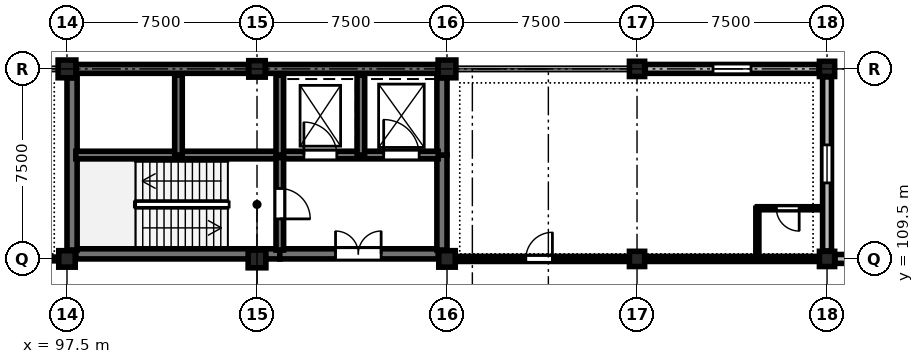
"""IFC4 building model, lengths in metres.
Left out: names, types, materials, properties, quantities, classifications, styles, units other than length and angle.
Written with IfcOpenShell. Run it as: python <this file> out.ifc"""

import sys

from ifc_helpers import new_model, si_unit, direction, frame, frame_2d, origin, origin_2d, place, context, subcontext, project, spatial, rectangle, circle, extrude, element, fill, save


model = new_model("IFC4")
c1 = context("Model", 3, precision=1e-05, world=origin(), true_north=direction((0.0, 1.0)))
c2 = subcontext(c1, "Body", "Model", "MODEL_VIEW")
j1 = project(units=[si_unit("LENGTHUNIT", "METRE"), si_unit("PLANEANGLEUNIT", "RADIAN")], contexts=[c1])
p1 = place(None, origin())
s1 = spatial("IfcSite", under=j1, at=p1, CompositionType="ELEMENT")
p2 = place(p1, origin())
s2 = spatial("IfcBuilding", under=s1, at=p2, CompositionType="ELEMENT")
p3 = place(p2, frame((0.0, 0.0, 9.3)))
s3 = spatial("IfcBuildingStorey", under=s2, at=p3, CompositionType="ELEMENT", Elevation=9.3)
p4 = place(p3, frame((97.5, 109.5, 0.0), z_axis=(0.0, 0.0, 1.0), x_axis=(1.0, 0.0, 0.0)))
e1 = element("IfcColumn", 1, at=p4, inside=s3, PredefinedType="COLUMN", context=c2, shape_type="SweptSolid", body=[
    extrude(rectangle(XDim=0.65, YDim=0.65, at=origin_2d()), origin(), (0.0, 0.0, 1.0), 4.8),
])
for number, where, z_axis, x_axis in (
    (2, (97.5, 117.0, 0.0), (0.0, 0.0, 1.0), (1.0, 0.0, 0.0)),
    (3, (105.0, 109.5, 0.0), (0.0, 0.0, 1.0), (1.0, 0.0, 0.0)),
):
    element("IfcColumn", number, at=place(p3, frame(where, z_axis=z_axis, x_axis=x_axis)), inside=s3, PredefinedType="COLUMN", context=c2, shape_type="SweptSolid", body=[
        extrude(rectangle(XDim=0.7, YDim=0.7, at=origin_2d()), origin(), (0.0, 0.0, 1.0), 4.8),
    ])
for number, where, z_axis, x_axis in (
    (4, (105.0, 117.0, 0.0), (0.0, 0.0, 1.0), (1.0, 0.0, 0.0)),
    (5, (112.5, 109.5, 0.0), (0.0, 0.0, 1.0), (1.0, 0.0, 0.0)),
):
    element("IfcColumn", number, at=place(p3, frame(where, z_axis=z_axis, x_axis=x_axis)), inside=s3, PredefinedType="COLUMN", context=c2, shape_type="SweptSolid", body=[
        extrude(rectangle(XDim=0.65, YDim=0.65, at=origin_2d()), origin(), (0.0, 0.0, 1.0), 4.8),
    ])
p5 = place(p3, frame((112.5, 117.0, 0.0), z_axis=(0.0, 0.0, 1.0), x_axis=(1.0, 0.0, 0.0)))
e6 = element("IfcColumn", 6, at=p5, inside=s3, PredefinedType="COLUMN", context=c2, shape_type="SweptSolid", body=[
    extrude(rectangle(XDim=0.7, YDim=0.7, at=origin_2d()), origin(), (0.0, 0.0, 1.0), 4.8),
])
p6 = place(p3, frame((120.0, 109.5, 0.0), z_axis=(0.0, 0.0, 1.0), x_axis=(1.0, 0.0, 0.0)))
e7 = element("IfcColumn", 7, at=p6, inside=s3, PredefinedType="COLUMN", context=c2, shape_type="SweptSolid", body=[
    extrude(circle(Radius=0.3, at=origin_2d()), origin(), (0.0, 0.0, 1.0), 4.8),
])
for number, where, z_axis, x_axis in (
    (8, (120.0, 117.0, 0.0), (0.0, 0.0, 1.0), (1.0, 0.0, 0.0)),
    (9, (127.5, 109.5, 0.0), (0.0, 0.0, 1.0), (1.0, 0.0, 0.0)),
    (10, (127.5, 117.0, 0.0), (0.0, 0.0, 1.0), (1.0, 0.0, 0.0)),
):
    element("IfcColumn", number, at=place(p3, frame(where, z_axis=z_axis, x_axis=x_axis)), inside=s3, PredefinedType="COLUMN", context=c2, shape_type="SweptSolid", body=[
        extrude(rectangle(XDim=0.6, YDim=0.6, at=origin_2d()), origin(), (0.0, 0.0, 1.0), 4.8),
    ])
for number, where, z_axis, x_axis in (
    (11, (97.86, 117.0, 0.0), (0.0, 0.0, 1.0), (1.0, 0.0, 0.0)),
    (12, (105.335, 117.0, 0.0), (0.0, 0.0, 1.0), (1.0, 0.0, 0.0)),
):
    element("IfcWall", number, at=place(p3, frame(where, z_axis=z_axis, x_axis=x_axis)), inside=s3, PredefinedType="SHEAR", context=c2, shape_type="SweptSolid", body=[
        extrude(rectangle(XDim=6.805, YDim=0.35, at=frame_2d((3.402, 0.0))), origin(), (0.0, 0.0, 1.0), 4.55),
    ])
p7 = place(p3, frame((120.31, 117.0, 0.0), z_axis=(0.0, 0.0, 1.0), x_axis=(1.0, 0.0, 0.0)))
e13 = element("IfcWall", 13, at=p7, inside=s3, PredefinedType="STANDARD", context=c2, shape_type="SweptSolid", body=[
    extrude(rectangle(XDim=6.88, YDim=0.35, at=frame_2d((3.44, 0.0))), origin(), (0.0, 0.0, 1.0), 3.95),
])
p8 = place(p7, frame((2.69, 0.0, 0.9)))
e14 = element("IfcOpeningElement", 14, at=p8, cuts=e13, PredefinedType="OPENING", context=c2, shape_type="SweptSolid", body=[
    extrude(rectangle(XDim=1.5, YDim=2.1, at=frame_2d((0.75, 1.05))), frame((0.0, 0.185, 0.0), z_axis=(0.0, -1.0, 0.0), x_axis=(1.0, 0.0, 0.0)), (0.0, 0.0, 1.0), 0.37),
])
p9 = place(p3, frame((127.5, 116.69, 0.0), z_axis=(0.0, 0.0, 1.0), x_axis=(0.0, -1.0, 0.0)))
e15 = element("IfcWall", 15, at=p9, inside=s3, PredefinedType="STANDARD", context=c2, shape_type="SweptSolid", body=[
    extrude(rectangle(XDim=6.88, YDim=0.35, at=frame_2d((3.44, 0.0))), origin(), (0.0, 0.0, 1.0), 3.95),
])
p10 = place(p9, frame((2.69, 0.0, 0.9)))
e16 = element("IfcOpeningElement", 16, at=p10, cuts=e15, PredefinedType="OPENING", context=c2, shape_type="SweptSolid", body=[
    extrude(rectangle(XDim=1.5, YDim=2.1, at=frame_2d((0.75, 1.05))), frame((0.0, 0.185, 0.0), z_axis=(0.0, -1.0, 0.0), x_axis=(1.0, 0.0, 0.0)), (0.0, 0.0, 1.0), 0.37),
])
p11 = place(p3, frame((127.81, 109.5, 0.0), z_axis=(0.0, 0.0, 1.0), x_axis=(1.0, 0.0, 0.0)))
e17 = element("IfcWall", 17, at=p11, inside=s3, PredefinedType="STANDARD", context=c2, shape_type="SweptSolid", body=[
    extrude(rectangle(XDim=6.88, YDim=0.35, at=frame_2d((3.44, 0.0))), origin(), (0.0, 0.0, 1.0), 3.95),
])
p12 = place(p11, frame((2.69, 0.0, 0.9)))
e18 = element("IfcOpeningElement", 18, at=p12, cuts=e17, PredefinedType="OPENING", context=c2, shape_type="SweptSolid", body=[
    extrude(rectangle(XDim=1.5, YDim=2.1, at=frame_2d((0.75, 1.05))), frame((0.0, 0.185, 0.0), z_axis=(0.0, -1.0, 0.0), x_axis=(1.0, 0.0, 0.0)), (0.0, 0.0, 1.0), 0.37),
])
p13 = place(p3, frame((97.85, 109.7, 0.0), z_axis=(0.0, 0.0, 1.0), x_axis=(1.0, 0.0, 0.0)))
e19 = element("IfcWall", 19, at=p13, inside=s3, PredefinedType="SHEAR", context=c2, shape_type="SweptSolid", body=[
    extrude(rectangle(XDim=8.05, YDim=0.4, at=frame_2d((4.025, 0.0))), origin(), (0.0, 0.0, 1.0), 4.55),
])
p14 = place(p3, frame((105.9, 109.7, 0.0), z_axis=(0.0, 0.0, 1.0), x_axis=(1.0, 0.0, 0.0)))
e20 = element("IfcWall", 20, at=p14, inside=s3, PredefinedType="SHEAR", context=c2, shape_type="SweptSolid", body=[
    extrude(rectangle(XDim=6.25, YDim=0.4, at=frame_2d((3.125, 0.0))), origin(), (0.0, 0.0, 1.0), 4.55),
])
p15 = place(p14, frame((2.2, 0.0, 0.0)))
e21 = element("IfcOpeningElement", 21, at=p15, cuts=e20, PredefinedType="OPENING", context=c2, shape_type="SweptSolid", body=[
    extrude(rectangle(XDim=1.8, YDim=2.25, at=frame_2d((0.9, 1.125))), frame((0.0, 0.21, 0.0), z_axis=(0.0, -1.0, 0.0), x_axis=(1.0, 0.0, 0.0)), (0.0, 0.0, 1.0), 0.42),
])
p16 = place(p3, frame((97.7, 109.85, 0.0), z_axis=(0.0, 0.0, 1.0), x_axis=(0.0, 1.0, 0.0)))
e22 = element("IfcWall", 22, at=p16, inside=s3, PredefinedType="SHEAR", context=c2, shape_type="SweptSolid", body=[
    extrude(rectangle(XDim=6.8, YDim=0.4, at=frame_2d((3.4, 0.0))), origin(), (0.0, 0.0, 1.0), 4.55),
])
p17 = place(p3, frame((112.3, 109.85, 0.0), z_axis=(0.0, 0.0, 1.0), x_axis=(0.0, 1.0, 0.0)))
e23 = element("IfcWall", 23, at=p17, inside=s3, PredefinedType="SHEAR", context=c2, shape_type="SweptSolid", body=[
    extrude(rectangle(XDim=3.75, YDim=0.4, at=frame_2d((1.875, 0.0))), origin(), (0.0, 0.0, 1.0), 4.55),
])
p18 = place(p3, frame((112.3, 113.6, 0.0), z_axis=(0.0, 0.0, 1.0), x_axis=(0.0, 1.0, 0.0)))
e24 = element("IfcWall", 24, at=p18, inside=s3, PredefinedType="SHEAR", context=c2, shape_type="SweptSolid", body=[
    extrude(rectangle(XDim=3.05, YDim=0.4, at=frame_2d((1.525, 0.0))), origin(), (0.0, 0.0, 1.0), 4.55),
])
p19 = place(p3, frame((97.85, 113.6, 0.0), z_axis=(0.0, 0.0, 1.0), x_axis=(1.0, 0.0, 0.0)))
e25 = element("IfcWall", 25, at=p19, inside=s3, PredefinedType="SHEAR", context=c2, shape_type="SweptSolid", body=[
    extrude(rectangle(XDim=8.05, YDim=0.3, at=frame_2d((4.025, 0.0))), origin(), (0.0, 0.0, 1.0), 4.55),
])
p20 = place(p3, frame((105.9, 113.6, 0.0), z_axis=(0.0, 0.0, 1.0), x_axis=(1.0, 0.0, 0.0)))
e26 = element("IfcWall", 26, at=p20, inside=s3, PredefinedType="SHEAR", context=c2, shape_type="SweptSolid", body=[
    extrude(rectangle(XDim=6.25, YDim=0.3, at=frame_2d((3.125, 0.0))), origin(), (0.0, 0.0, 1.0), 4.55),
])
p21 = place(p20, frame((0.95, 0.0, 0.0)))
e27 = element("IfcOpeningElement", 27, at=p21, cuts=e26, PredefinedType="OPENING", context=c2, shape_type="SweptSolid", body=[
    extrude(rectangle(XDim=1.3, YDim=2.2, at=frame_2d((0.65, 1.1))), frame((0.0, 0.16, 0.0), z_axis=(0.0, -1.0, 0.0), x_axis=(1.0, 0.0, 0.0)), (0.0, 0.0, 1.0), 0.32),
])
p22 = place(p20, frame((4.1, 0.0, 0.0)))
e28 = element("IfcOpeningElement", 28, at=p22, cuts=e26, PredefinedType="OPENING", context=c2, shape_type="SweptSolid", body=[
    extrude(rectangle(XDim=1.4, YDim=2.25, at=frame_2d((0.7, 1.125))), frame((0.0, 0.16, 0.0), z_axis=(0.0, -1.0, 0.0), x_axis=(1.0, 0.0, 0.0)), (0.0, 0.0, 1.0), 0.32),
])
p23 = place(p3, frame((105.9, 113.5, 0.0), z_axis=(0.0, 0.0, 1.0), x_axis=(0.0, -1.0, 0.0)))
e29 = element("IfcWall", 29, at=p23, inside=s3, PredefinedType="SHEAR", context=c2, shape_type="SweptSolid", body=[
    extrude(rectangle(XDim=3.65, YDim=0.3, at=frame_2d((1.825, 0.0))), origin(), (0.0, 0.0, 1.0), 4.55),
])
p24 = place(p23, frame((1.22, 0.0, 0.0)))
e30 = element("IfcOpeningElement", 30, at=p24, cuts=e29, PredefinedType="OPENING", context=c2, shape_type="SweptSolid", body=[
    extrude(rectangle(XDim=1.2, YDim=2.25, at=frame_2d((0.6, 1.125))), frame((0.0, 0.16, 0.0), z_axis=(0.0, -1.0, 0.0), x_axis=(1.0, 0.0, 0.0)), (0.0, 0.0, 1.0), 0.32),
])
for number, where, z_axis, x_axis in (
    (31, (101.9, 113.6, 0.0), (0.0, 0.0, 1.0), (0.0, 1.0, 0.0)),
    (32, (105.9, 113.6, 0.0), (0.0, 0.0, 1.0), (0.0, 1.0, 0.0)),
    (33, (109.1, 113.6, 0.0), (0.0, 0.0, 1.0), (0.0, 1.0, 0.0)),
):
    element("IfcWall", number, at=place(p3, frame(where, z_axis=z_axis, x_axis=x_axis)), inside=s3, PredefinedType="SHEAR", context=c2, shape_type="SweptSolid", body=[
        extrude(rectangle(XDim=3.15, YDim=0.3, at=frame_2d((1.575, 0.0))), origin(), (0.0, 0.0, 1.0), 4.55),
    ])
p25 = place(p3, frame((75.3, 109.5, 0.0), z_axis=(0.0, 0.0, 1.0), x_axis=(1.0, 0.0, 0.0)))
e34 = element("IfcWall", 34, at=p25, inside=s3, PredefinedType="PARTITIONING", context=c2, shape_type="SweptSolid", body=[
    extrude(rectangle(XDim=21.9, YDim=0.15, at=frame_2d((10.95, 0.0))), origin(), (0.0, 0.0, 1.0), 3.985),
])
p26 = place(p25, frame((10.175, 0.0, 0.0)))
e35 = element("IfcOpeningElement", 35, at=p26, cuts=e34, PredefinedType="OPENING", context=c2, shape_type="SweptSolid", body=[
    extrude(rectangle(XDim=1.55, YDim=2.35, at=frame_2d((0.775, 1.175))), frame((0.0, 0.085, 0.0), z_axis=(0.0, -1.0, 0.0), x_axis=(1.0, 0.0, 0.0)), (0.0, 0.0, 1.0), 0.17),
])
p27 = place(p3, frame((112.8, 109.5, 0.0), z_axis=(0.0, 0.0, 1.0), x_axis=(1.0, 0.0, 0.0)))
e36 = element("IfcWall", 36, at=p27, inside=s3, PredefinedType="STANDARD", context=c2, shape_type="SweptSolid", body=[
    extrude(rectangle(XDim=14.35, YDim=0.2, at=frame_2d((7.175, 0.0))), origin(), (0.0, 0.0, 1.0), 3.985),
])
p28 = place(p27, frame((2.81, 0.0, 0.0)))
e37 = element("IfcOpeningElement", 37, at=p28, cuts=e36, PredefinedType="OPENING", context=c2, shape_type="SweptSolid", body=[
    extrude(rectangle(XDim=1.05, YDim=2.2, at=frame_2d((0.525, 1.1))), frame((0.0, 0.11, 0.0), z_axis=(0.0, -1.0, 0.0), x_axis=(1.0, 0.0, 0.0)), (0.0, 0.0, 1.0), 0.22),
])
p29 = place(p3, frame((127.15, 111.5, 0.0), z_axis=(0.0, 0.0, 1.0), x_axis=(-1.0, 0.0, 0.0)))
e38 = element("IfcWall", 38, at=p29, inside=s3, PredefinedType="PARTITIONING", context=c2, shape_type="SweptSolid", body=[
    extrude(rectangle(XDim=2.4, YDim=0.12, at=frame_2d((1.2, 0.0))), origin(), (0.0, 0.0, 1.0), 4.535),
])
p30 = place(p29, frame((0.75, 0.0, 0.0)))
e39 = element("IfcOpeningElement", 39, at=p30, cuts=e38, PredefinedType="OPENING", context=c2, shape_type="SweptSolid", body=[
    extrude(rectangle(XDim=0.9, YDim=2.1, at=frame_2d((0.45, 1.05))), frame((0.0, 0.07, 0.0), z_axis=(0.0, -1.0, 0.0), x_axis=(1.0, 0.0, 0.0)), (0.0, 0.0, 1.0), 0.14),
])
p31 = place(p3, frame((124.75, 109.5, 0.0), z_axis=(0.0, 0.0, 1.0), x_axis=(0.0, 1.0, 0.0)))
e40 = element("IfcWall", 40, at=p31, inside=s3, PredefinedType="PARTITIONING", context=c2, shape_type="SweptSolid", body=[
    extrude(rectangle(XDim=2.0, YDim=0.12, at=frame_2d((1.0, 0.0))), origin(), (0.0, 0.0, 1.0), 4.535),
])
p32 = place(p8, origin())
e41 = element("IfcWindow", 41, at=p32, inside=s3, PartitioningType="SINGLE_PANEL", PredefinedType="WINDOW", context=c2, shape_type="SweptSolid", body=[
    extrude(rectangle(XDim=1.5, YDim=2.1, at=frame_2d((0.75, 1.05))), frame((0.0, 0.03, 0.0), z_axis=(0.0, -1.0, 0.0), x_axis=(1.0, 0.0, 0.0)), (0.0, 0.0, 1.0), 0.06),
])
fill(e14, e41)
p33 = place(p10, origin())
e42 = element("IfcWindow", 42, at=p33, inside=s3, PartitioningType="SINGLE_PANEL", PredefinedType="WINDOW", context=c2, shape_type="SweptSolid", body=[
    extrude(rectangle(XDim=1.5, YDim=2.1, at=frame_2d((0.75, 1.05))), frame((0.0, 0.03, 0.0), z_axis=(0.0, -1.0, 0.0), x_axis=(1.0, 0.0, 0.0)), (0.0, 0.0, 1.0), 0.06),
])
fill(e16, e42)
p34 = place(p15, origin())
e43 = element("IfcDoor", 43, at=p34, inside=s3, OperationType="DOUBLE_DOOR_SINGLE_SWING", PredefinedType="DOOR", context=c2, shape_type="SweptSolid", body=[
    extrude(rectangle(XDim=1.8, YDim=2.25, at=frame_2d((0.9, 1.125))), frame((0.0, 0.025, 0.0), z_axis=(0.0, -1.0, 0.0), x_axis=(1.0, 0.0, 0.0)), (0.0, 0.0, 1.0), 0.05),
])
fill(e21, e43)
p35 = place(p21, origin())
e44 = element("IfcDoor", 44, at=p35, inside=s3, OperationType="DOUBLE_DOOR_SLIDING", PredefinedType="DOOR", context=c2, shape_type="SweptSolid", body=[
    extrude(rectangle(XDim=1.3, YDim=2.2, at=frame_2d((0.65, 1.1))), frame((0.0, 0.025, 0.0), z_axis=(0.0, -1.0, 0.0), x_axis=(1.0, 0.0, 0.0)), (0.0, 0.0, 1.0), 0.05),
])
fill(e27, e44)
p36 = place(p22, origin())
e45 = element("IfcDoor", 45, at=p36, inside=s3, OperationType="DOUBLE_DOOR_SLIDING", PredefinedType="DOOR", context=c2, shape_type="SweptSolid", body=[
    extrude(rectangle(XDim=1.4, YDim=2.25, at=frame_2d((0.7, 1.125))), frame((0.0, 0.025, 0.0), z_axis=(0.0, -1.0, 0.0), x_axis=(1.0, 0.0, 0.0)), (0.0, 0.0, 1.0), 0.05),
])
fill(e28, e45)
p37 = place(p24, origin())
e46 = element("IfcDoor", 46, at=p37, inside=s3, OperationType="SINGLE_SWING_RIGHT", PredefinedType="DOOR", context=c2, shape_type="SweptSolid", body=[
    extrude(rectangle(XDim=1.2, YDim=2.25, at=frame_2d((0.6, 1.125))), frame((0.0, 0.025, 0.0), z_axis=(0.0, -1.0, 0.0), x_axis=(1.0, 0.0, 0.0)), (0.0, 0.0, 1.0), 0.05),
])
fill(e30, e46)
p38 = place(p28, origin())
e47 = element("IfcDoor", 47, at=p38, inside=s3, OperationType="SINGLE_SWING_RIGHT", PredefinedType="DOOR", context=c2, shape_type="SweptSolid", body=[
    extrude(rectangle(XDim=1.05, YDim=2.2, at=frame_2d((0.525, 1.1))), frame((0.0, 0.025, 0.0), z_axis=(0.0, -1.0, 0.0), x_axis=(1.0, 0.0, 0.0)), (0.0, 0.0, 1.0), 0.05),
])
fill(e37, e47)
p39 = place(p30, origin())
e48 = element("IfcDoor", 48, at=p39, inside=s3, OperationType="SINGLE_SWING_LEFT", PredefinedType="DOOR", context=c2, shape_type="SweptSolid", body=[
    extrude(rectangle(XDim=0.9, YDim=2.1, at=frame_2d((0.45, 1.05))), frame((0.0, 0.025, 0.0), z_axis=(0.0, -1.0, 0.0), x_axis=(1.0, 0.0, 0.0)), (0.0, 0.0, 1.0), 0.05),
])
fill(e39, e48)
save(model, sys.argv[1])
